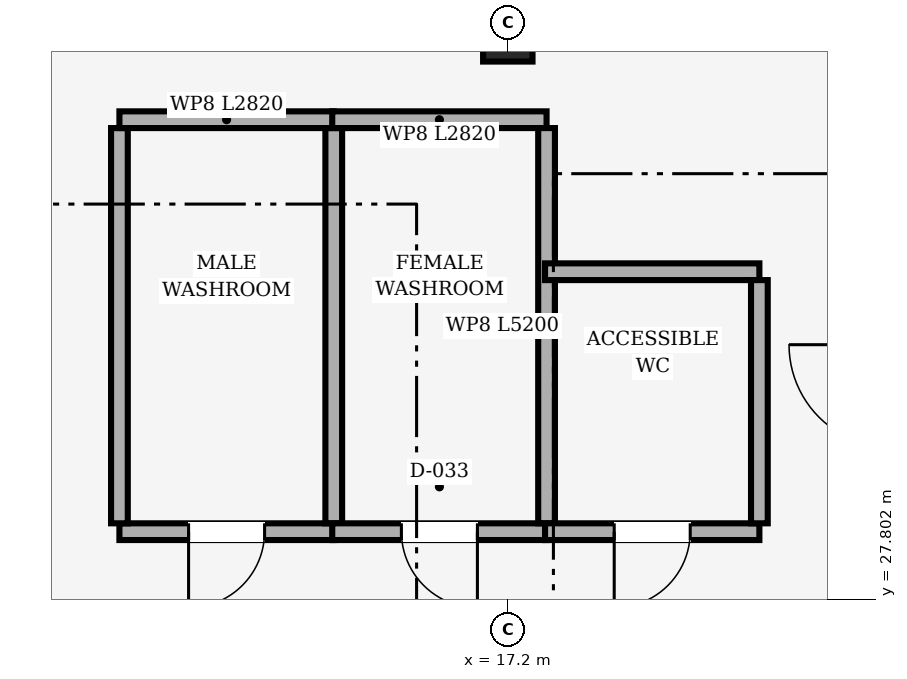
"""IFC4 building model, lengths in metres.
Left out: names, types, materials, properties, quantities, classifications, styles, units other than length and angle.
Written with IfcOpenShell. Run it as: python <this file> out.ifc"""

import sys

from ifc_helpers import new_model, si_unit, direction, frame, frame_2d, origin, origin_2d, place, context, subcontext, project, spatial, rectangle, extrude, element, fill, save


model = new_model("IFC4")
c1 = context("Model", 3, precision=1e-05, world=origin(), true_north=direction((0.0, 1.0)))
c2 = subcontext(c1, "Body", "Model", "MODEL_VIEW")
j1 = project(units=[si_unit("LENGTHUNIT", "METRE"), si_unit("PLANEANGLEUNIT", "RADIAN")], contexts=[c1])
p1 = place(None, origin())
s1 = spatial("IfcSite", under=j1, at=p1, CompositionType="ELEMENT")
p2 = place(p1, origin())
s2 = spatial("IfcBuilding", under=s1, at=p2, CompositionType="ELEMENT")
p3 = place(p2, frame((0.0, 0.0, 19.05)))
s3 = spatial("IfcBuildingStorey", under=s2, at=p3, CompositionType="ELEMENT", Elevation=19.05)
p4 = place(p3, frame((17.2, 35.2, 0.0), z_axis=(0.0, 0.0, 1.0), x_axis=(1.0, 0.0, 0.0)))
e1 = element("IfcColumn", 1, at=p4, inside=s3, PredefinedType="COLUMN", context=c2, shape_type="SweptSolid", body=[
    extrude(rectangle(XDim=0.65, YDim=0.65, at=origin_2d()), origin(), (0.0, 0.0, 1.0), 3.06),
])
p5 = place(p3, frame((14.91, 28.69, 0.0), z_axis=(0.0, 0.0, 1.0), x_axis=(-1.0, 0.0, 0.0)))
e2 = element("IfcWall", 2, at=p5, inside=s3, PredefinedType="PLUMBINGWALL", context=c2, shape_type="SweptSolid", body=[
    extrude(rectangle(XDim=2.82, YDim=0.22, at=frame_2d((1.41, 0.0))), origin(), (0.0, 0.0, 1.0), 3.04),
])
p6 = place(p5, frame((0.91, 0.0, 0.0)))
e3 = element("IfcOpeningElement", 3, at=p6, cuts=e2, PredefinedType="OPENING", context=c2, shape_type="SweptSolid", body=[
    extrude(rectangle(XDim=1.0, YDim=2.1, at=frame_2d((0.5, 1.05))), frame((0.0, 0.11, 0.0), z_axis=(0.0, -1.0, 0.0), x_axis=(1.0, 0.0, 0.0)), (0.0, 0.0, 1.0), 0.22),
])
p7 = place(p3, frame((12.09, 28.8, 0.0), z_axis=(0.0, 0.0, 1.0), x_axis=(0.0, 1.0, 0.0)))
e4 = element("IfcWall", 4, at=p7, inside=s3, PredefinedType="PLUMBINGWALL", context=c2, shape_type="SweptSolid", body=[
    extrude(rectangle(XDim=5.2, YDim=0.22, at=frame_2d((2.6, 0.0))), origin(), (0.0, 0.0, 1.0), 3.04),
])
p8 = place(p3, frame((12.09, 34.11, 0.0), z_axis=(0.0, 0.0, 1.0), x_axis=(1.0, 0.0, 0.0)))
e5 = element("IfcWall", 5, at=p8, inside=s3, PredefinedType="PLUMBINGWALL", context=c2, shape_type="SweptSolid", body=[
    extrude(rectangle(XDim=2.82, YDim=0.22, at=frame_2d((1.41, 0.0))), origin(), (0.0, 0.0, 1.0), 3.04),
])
p9 = place(p3, frame((14.91, 34.0, 0.0), z_axis=(0.0, 0.0, 1.0), x_axis=(0.0, -1.0, 0.0)))
e6 = element("IfcWall", 6, at=p9, inside=s3, PredefinedType="PLUMBINGWALL", context=c2, shape_type="SweptSolid", body=[
    extrude(rectangle(XDim=5.2, YDim=0.22, at=frame_2d((2.6, 0.0))), origin(), (0.0, 0.0, 1.0), 3.04),
])
p10 = place(p3, frame((17.71, 28.69, 0.0), z_axis=(0.0, 0.0, 1.0), x_axis=(-1.0, 0.0, 0.0)))
e7 = element("IfcWall", 7, at=p10, inside=s3, PredefinedType="PLUMBINGWALL", context=c2, shape_type="SweptSolid", body=[
    extrude(rectangle(XDim=2.82, YDim=0.22, at=frame_2d((1.41, 0.0))), origin(), (0.0, 0.0, 1.0), 3.04),
])
p11 = place(p10, frame((0.91, 0.0, 0.0)))
e8 = element("IfcOpeningElement", 8, at=p11, cuts=e7, PredefinedType="OPENING", context=c2, shape_type="SweptSolid", body=[
    extrude(rectangle(XDim=1.0, YDim=2.1, at=frame_2d((0.5, 1.05))), frame((0.0, 0.11, 0.0), z_axis=(0.0, -1.0, 0.0), x_axis=(1.0, 0.0, 0.0)), (0.0, 0.0, 1.0), 0.22),
])
p12 = place(p3, frame((14.89, 34.11, 0.0), z_axis=(0.0, 0.0, 1.0), x_axis=(1.0, 0.0, 0.0)))
e9 = element("IfcWall", 9, at=p12, inside=s3, PredefinedType="PLUMBINGWALL", context=c2, shape_type="SweptSolid", body=[
    extrude(rectangle(XDim=2.82, YDim=0.22, at=frame_2d((1.41, 0.0))), origin(), (0.0, 0.0, 1.0), 3.04),
])
p13 = place(p3, frame((17.71, 34.0, 0.0), z_axis=(0.0, 0.0, 1.0), x_axis=(0.0, -1.0, 0.0)))
e10 = element("IfcWall", 10, at=p13, inside=s3, PredefinedType="PLUMBINGWALL", context=c2, shape_type="SweptSolid", body=[
    extrude(rectangle(XDim=5.2, YDim=0.22, at=frame_2d((2.6, 0.0))), origin(), (0.0, 0.0, 1.0), 3.04),
])
p14 = place(p3, frame((20.51, 28.69, 0.0), z_axis=(0.0, 0.0, 1.0), x_axis=(-1.0, 0.0, 0.0)))
e11 = element("IfcWall", 11, at=p14, inside=s3, PredefinedType="PLUMBINGWALL", context=c2, shape_type="SweptSolid", body=[
    extrude(rectangle(XDim=2.82, YDim=0.22, at=frame_2d((1.41, 0.0))), origin(), (0.0, 0.0, 1.0), 3.04),
])
p15 = place(p14, frame((0.91, 0.0, 0.0)))
e12 = element("IfcOpeningElement", 12, at=p15, cuts=e11, PredefinedType="OPENING", context=c2, shape_type="SweptSolid", body=[
    extrude(rectangle(XDim=1.0, YDim=2.1, at=frame_2d((0.5, 1.05))), frame((0.0, 0.11, 0.0), z_axis=(0.0, -1.0, 0.0), x_axis=(1.0, 0.0, 0.0)), (0.0, 0.0, 1.0), 0.22),
])
p16 = place(p3, frame((17.69, 32.11, 0.0), z_axis=(0.0, 0.0, 1.0), x_axis=(1.0, 0.0, 0.0)))
e13 = element("IfcWall", 13, at=p16, inside=s3, PredefinedType="PLUMBINGWALL", context=c2, shape_type="SweptSolid", body=[
    extrude(rectangle(XDim=2.82, YDim=0.22, at=frame_2d((1.41, 0.0))), origin(), (0.0, 0.0, 1.0), 3.04),
])
p17 = place(p3, frame((20.51, 32.0, 0.0), z_axis=(0.0, 0.0, 1.0), x_axis=(0.0, -1.0, 0.0)))
e14 = element("IfcWall", 14, at=p17, inside=s3, PredefinedType="PLUMBINGWALL", context=c2, shape_type="SweptSolid", body=[
    extrude(rectangle(XDim=3.2, YDim=0.22, at=frame_2d((1.6, 0.0))), origin(), (0.0, 0.0, 1.0), 3.04),
])
p18 = place(p6, origin())
e15 = element("IfcDoor", 15, at=p18, inside=s3, OperationType="SINGLE_SWING_RIGHT", PredefinedType="DOOR", context=c2, shape_type="SweptSolid", body=[
    extrude(rectangle(XDim=1.0, YDim=2.1, at=frame_2d((0.5, 1.05))), frame((0.0, 0.025, 0.0), z_axis=(0.0, -1.0, 0.0), x_axis=(1.0, 0.0, 0.0)), (0.0, 0.0, 1.0), 0.05),
])
fill(e3, e15)
p19 = place(p11, origin())
e16 = element("IfcDoor", 16, at=p19, inside=s3, OperationType="SINGLE_SWING_LEFT", PredefinedType="DOOR", context=c2, shape_type="SweptSolid", body=[
    extrude(rectangle(XDim=1.0, YDim=2.1, at=frame_2d((0.5, 1.05))), frame((0.0, 0.025, 0.0), z_axis=(0.0, -1.0, 0.0), x_axis=(1.0, 0.0, 0.0)), (0.0, 0.0, 1.0), 0.05),
])
fill(e8, e16)
p20 = place(p15, origin())
e17 = element("IfcDoor", 17, at=p20, inside=s3, OperationType="SINGLE_SWING_RIGHT", PredefinedType="DOOR", context=c2, shape_type="SweptSolid", body=[
    extrude(rectangle(XDim=1.0, YDim=2.1, at=frame_2d((0.5, 1.05))), frame((0.0, 0.025, 0.0), z_axis=(0.0, -1.0, 0.0), x_axis=(1.0, 0.0, 0.0)), (0.0, 0.0, 1.0), 0.05),
])
fill(e12, e17)
save(model, sys.argv[1])
